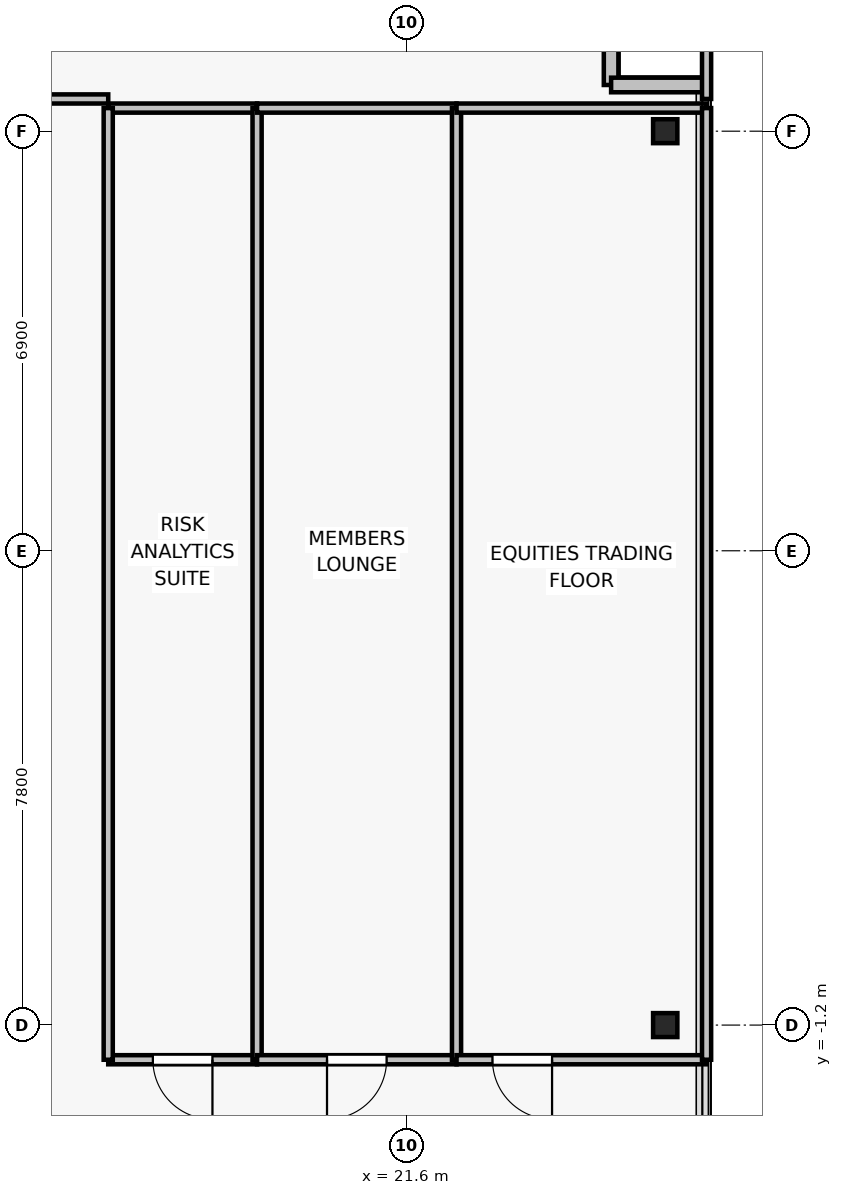
"""IFC4 building model, lengths in metres.
Left out: names, types, materials, properties, quantities, classifications, styles, units other than length and angle.
Written with IfcOpenShell. Run it as: python <this file> out.ifc"""

import sys

from ifc_helpers import new_model, si_unit, direction, frame, frame_2d, origin, origin_2d, place, context, subcontext, project, spatial, rectangle, i_section, extrude, source, transform, mapped, element, fill, save


model = new_model("IFC4")
c1 = context("Model", 3, precision=1e-05, world=origin(), true_north=direction((0.0, 1.0)))
c2 = subcontext(c1, "Body", "Model", "MODEL_VIEW")
j1 = project(units=[si_unit("LENGTHUNIT", "METRE"), si_unit("PLANEANGLEUNIT", "RADIAN")], contexts=[c1])
p1 = place(None, origin())
s1 = spatial("IfcSite", under=j1, at=p1, CompositionType="ELEMENT")
p2 = place(p1, origin())
s2 = spatial("IfcBuilding", under=s1, at=p2, CompositionType="ELEMENT")
p3 = place(p2, frame((0.0, 0.0, 185.8)))
s3 = spatial("IfcBuildingStorey", under=s2, at=p3, CompositionType="ELEMENT", Elevation=185.8)
for number, where, z_axis, x_axis in (
    (1, (25.85, -1.2, 0.0), (0.0, 0.0, 1.0), (1.0, 0.0, 0.0)),
    (2, (25.85, 13.5, 0.0), (0.0, 0.0, 1.0), (1.0, 0.0, 0.0)),
):
    element("IfcColumn", number, at=place(p3, frame(where, z_axis=z_axis, x_axis=x_axis)), inside=s3, PredefinedType="COLUMN", context=c2, shape_type="SweptSolid", body=[
        extrude(i_section(OverallWidth=0.399, OverallDepth=0.394, WebThickness=0.023, FlangeThickness=0.037, FilletRadius=0.015, at=origin_2d()), origin(), (0.0, 0.0, 1.0), 3.3),
    ])
for number, where, z_axis, x_axis in (
    (3, (24.96, 14.26, 0.0), (0.0, 0.0, 1.0), (0.0, 1.0, 0.0)),
    (4, (26.46, 14.26, 0.0), (0.0, 0.0, 1.0), (-1.0, 0.0, 0.0)),
):
    element("IfcWall", number, at=place(p3, frame(where, z_axis=z_axis, x_axis=x_axis)), inside=s3, PredefinedType="SOLIDWALL", context=c2, shape_type="SweptSolid", body=[
        extrude(rectangle(XDim=1.5, YDim=0.24, at=frame_2d((0.75, 0.0))), origin(), (0.0, 0.0, 1.0), 3.075),
    ])
p4 = place(p3, frame((19.138, -1.77, 0.0), z_axis=(0.0, 0.0, 1.0), x_axis=(-1.0, 0.0, 0.0)))
e5 = element("IfcWall", 5, at=p4, inside=s3, PredefinedType="PARTITIONING", context=c2, shape_type="SweptSolid", body=[
    extrude(rectangle(XDim=2.448, YDim=0.15, at=frame_2d((1.224, 0.0))), origin(), (0.0, 0.0, 1.0), 3.075),
])
p5 = place(p4, frame((0.734, 0.0, 0.0)))
e6 = element("IfcOpeningElement", 6, at=p5, cuts=e5, PredefinedType="OPENING", context=c2, shape_type="SweptSolid", body=[
    extrude(rectangle(XDim=0.98, YDim=2.15, at=frame_2d((0.49, 1.075))), frame((0.0, 0.085, 0.0), z_axis=(0.0, -1.0, 0.0), x_axis=(1.0, 0.0, 0.0)), (0.0, 0.0, 1.0), 0.17),
])
p6 = place(p3, frame((16.69, 13.88, 0.0), z_axis=(0.0, 0.0, 1.0), x_axis=(1.0, 0.0, 0.0)))
e7 = element("IfcWall", 7, at=p6, inside=s3, PredefinedType="PARTITIONING", context=c2, shape_type="SweptSolid", body=[
    extrude(rectangle(XDim=2.448, YDim=0.15, at=frame_2d((1.224, 0.0))), origin(), (0.0, 0.0, 1.0), 3.075),
])
for number, where, z_axis, x_axis in (
    (8, (16.69, -1.77, 0.0), (0.0, 0.0, 1.0), (0.0, 1.0, 0.0)),
    (9, (19.138, 13.88, 0.0), (0.0, 0.0, 1.0), (0.0, -1.0, 0.0)),
):
    element("IfcWall", number, at=place(p3, frame(where, z_axis=z_axis, x_axis=x_axis)), inside=s3, PredefinedType="PARTITIONING", context=c2, shape_type="SweptSolid", body=[
        extrude(rectangle(XDim=15.65, YDim=0.15, at=frame_2d((7.825, 0.0))), origin(), (0.0, 0.0, 1.0), 2.565),
    ])
p7 = place(p3, frame((22.418, -1.77, 0.0), z_axis=(0.0, 0.0, 1.0), x_axis=(-1.0, 0.0, 0.0)))
e10 = element("IfcWall", 10, at=p7, inside=s3, PredefinedType="PARTITIONING", context=c2, shape_type="SweptSolid", body=[
    extrude(rectangle(XDim=3.28, YDim=0.15, at=frame_2d((1.64, 0.0))), origin(), (0.0, 0.0, 1.0), 3.075),
])
p8 = place(p7, frame((1.15, 0.0, 0.0)))
e11 = element("IfcOpeningElement", 11, at=p8, cuts=e10, PredefinedType="OPENING", context=c2, shape_type="SweptSolid", body=[
    extrude(rectangle(XDim=0.98, YDim=2.15, at=frame_2d((0.49, 1.075))), frame((0.0, 0.085, 0.0), z_axis=(0.0, -1.0, 0.0), x_axis=(1.0, 0.0, 0.0)), (0.0, 0.0, 1.0), 0.17),
])
p9 = place(p3, frame((19.138, 13.88, 0.0), z_axis=(0.0, 0.0, 1.0), x_axis=(1.0, 0.0, 0.0)))
e12 = element("IfcWall", 12, at=p9, inside=s3, PredefinedType="PARTITIONING", context=c2, shape_type="SweptSolid", body=[
    extrude(rectangle(XDim=3.28, YDim=0.15, at=frame_2d((1.64, 0.0))), origin(), (0.0, 0.0, 1.0), 3.075),
])
p10 = place(p3, frame((22.418, 13.88, 0.0), z_axis=(0.0, 0.0, 1.0), x_axis=(0.0, -1.0, 0.0)))
e13 = element("IfcWall", 13, at=p10, inside=s3, PredefinedType="PARTITIONING", context=c2, shape_type="SweptSolid", body=[
    extrude(rectangle(XDim=15.65, YDim=0.15, at=frame_2d((7.825, 0.0))), origin(), (0.0, 0.0, 1.0), 2.565),
])
p11 = place(p3, frame((26.53, -1.77, 0.0), z_axis=(0.0, 0.0, 1.0), x_axis=(-1.0, 0.0, 0.0)))
e14 = element("IfcWall", 14, at=p11, inside=s3, PredefinedType="PARTITIONING", context=c2, shape_type="SweptSolid", body=[
    extrude(rectangle(XDim=4.112, YDim=0.15, at=frame_2d((2.056, 0.0))), origin(), (0.0, 0.0, 1.0), 2.565),
])
p12 = place(p11, frame((2.541, 0.0, 0.0)))
e15 = element("IfcOpeningElement", 15, at=p12, cuts=e14, PredefinedType="OPENING", context=c2, shape_type="SweptSolid", body=[
    extrude(rectangle(XDim=0.98, YDim=2.15, at=frame_2d((0.49, 1.075))), frame((0.0, 0.085, 0.0), z_axis=(0.0, -1.0, 0.0), x_axis=(1.0, 0.0, 0.0)), (0.0, 0.0, 1.0), 0.17),
])
p13 = place(p3, frame((22.418, 13.88, 0.0), z_axis=(0.0, 0.0, 1.0), x_axis=(1.0, 0.0, 0.0)))
e16 = element("IfcWall", 16, at=p13, inside=s3, PredefinedType="PARTITIONING", context=c2, shape_type="SweptSolid", body=[
    extrude(rectangle(XDim=4.112, YDim=0.15, at=frame_2d((2.056, 0.0))), origin(), (0.0, 0.0, 1.0), 3.075),
])
p14 = place(p3, frame((26.53, 13.88, 0.0), z_axis=(0.0, 0.0, 1.0), x_axis=(0.0, -1.0, 0.0)))
e17 = element("IfcWall", 17, at=p14, inside=s3, PredefinedType="PARTITIONING", context=c2, shape_type="SweptSolid", body=[
    extrude(rectangle(XDim=15.65, YDim=0.15, at=frame_2d((7.825, 0.0))), origin(), (0.0, 0.0, 1.0), 3.075),
])
p15 = place(p3, frame((16.69, 14.03, 0.0), z_axis=(0.0, 0.0, 1.0), x_axis=(-1.0, 0.0, 0.0)))
e18 = element("IfcWall", 18, at=p15, inside=s3, PredefinedType="PARTITIONING", context=c2, shape_type="SweptSolid", body=[
    extrude(rectangle(XDim=2.79, YDim=0.15, at=frame_2d((1.395, 0.0))), origin(), (0.0, 0.0, 1.0), 2.565),
])
p16 = place(p3, frame((26.53, 17.33, 0.0), z_axis=(0.0, 0.0, 1.0), x_axis=(0.0, -1.0, 0.0)))
e19 = element("IfcWall", 19, at=p16, inside=s3, PredefinedType="PARTITIONING", context=c2, shape_type="SweptSolid", body=[
    extrude(rectangle(XDim=3.3, YDim=0.15, at=frame_2d((1.65, 0.0))), origin(), (0.0, 0.0, 1.0), 3.075),
])
m1 = source(origin(), c2, "Body", "SweptSolid", [
    extrude(rectangle(XDim=0.98, YDim=2.15, at=frame_2d((0.49, 1.075))), frame((0.0, 0.025, 0.0), z_axis=(0.0, -1.0, 0.0), x_axis=(1.0, 0.0, 0.0)), (0.0, 0.0, 1.0), 0.05),
])
p17 = place(p5, origin())
e20 = element("IfcDoor", 20, at=p17, inside=s3, OperationType="SINGLE_SWING_LEFT", PredefinedType="DOOR", context=c2, shape_type="MappedRepresentation", body=[
    mapped(m1, transform((0.0, 0.0, 0.0), x_axis=(1.0, 0.0, 0.0), y_axis=(0.0, 1.0, 0.0), z_axis=(0.0, 0.0, 1.0), scale=1.0)),
])
fill(e6, e20)
p18 = place(p8, origin())
e21 = element("IfcDoor", 21, at=p18, inside=s3, OperationType="SINGLE_SWING_RIGHT", PredefinedType="DOOR", context=c2, shape_type="MappedRepresentation", body=[
    mapped(m1, transform((0.0, 0.0, 0.0), x_axis=(1.0, 0.0, 0.0), y_axis=(0.0, 1.0, 0.0), z_axis=(0.0, 0.0, 1.0), scale=1.0)),
])
fill(e11, e21)
p19 = place(p12, origin())
e22 = element("IfcDoor", 22, at=p19, inside=s3, OperationType="SINGLE_SWING_LEFT", PredefinedType="DOOR", context=c2, shape_type="MappedRepresentation", body=[
    mapped(m1, transform((0.0, 0.0, 0.0), x_axis=(1.0, 0.0, 0.0), y_axis=(0.0, 1.0, 0.0), z_axis=(0.0, 0.0, 1.0), scale=1.0)),
])
fill(e15, e22)
save(model, sys.argv[1])
